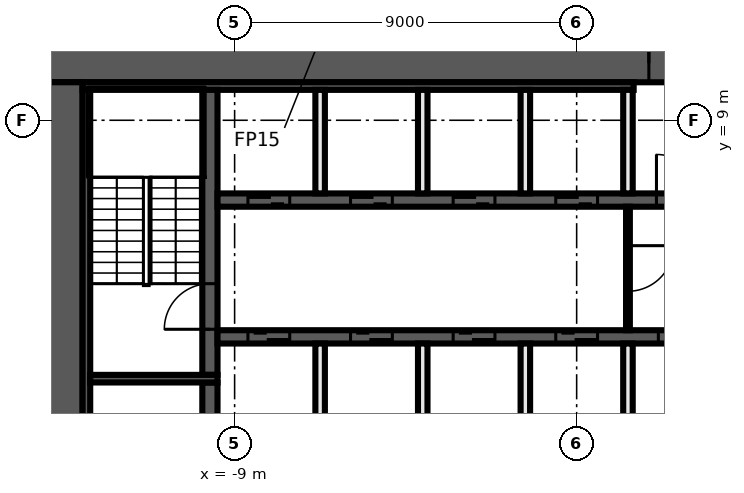
"""IFC4 building model, lengths in metres.
Left out: names, types, materials, properties, quantities, classifications, styles, units other than length and angle.
Written with IfcOpenShell. Run it as: python <this file> out.ifc"""

import sys

from ifc_helpers import new_model, si_unit, direction, frame, frame_2d, origin, place, context, subcontext, project, spatial, rectangle, extrude, element, fill, save


model = new_model("IFC4")
c1 = context("Model", 3, precision=1e-05, world=origin(), true_north=direction((0.0, 1.0)))
c2 = subcontext(c1, "Body", "Model", "MODEL_VIEW")
j1 = project(units=[si_unit("LENGTHUNIT", "METRE"), si_unit("PLANEANGLEUNIT", "RADIAN")], contexts=[c1])
p1 = place(None, origin())
s1 = spatial("IfcSite", under=j1, at=p1, CompositionType="ELEMENT")
p2 = place(p1, origin())
s2 = spatial("IfcBuilding", under=s1, at=p2, CompositionType="ELEMENT")
p3 = place(p2, frame((0.0, 0.0, 110.0)))
s3 = spatial("IfcBuildingStorey", under=s2, at=p3, CompositionType="ELEMENT", Elevation=110.0)
p4 = place(p3, frame((-14.0, 10.5, 0.0), z_axis=(0.0, 0.0, 1.0), x_axis=(1.0, 0.0, 0.0)))
e1 = element("IfcWall", 1, at=p4, inside=s3, PredefinedType="SHEAR", context=c2, shape_type="SweptSolid", body=[
    extrude(rectangle(XDim=28.0, YDim=1.0, at=frame_2d((14.0, 0.0))), origin(), (0.0, 0.0, 1.0), 3.3),
])
p5 = place(p4, frame((15.9, 0.0, 0.0)))
e2 = element("IfcOpeningElement", 2, at=p5, cuts=e1, PredefinedType="OPENING", context=c2, shape_type="SweptSolid", body=[
    extrude(rectangle(XDim=1.6, YDim=2.1, at=frame_2d((0.8, 1.05))), frame((0.0, 0.51, 0.0), z_axis=(0.0, -1.0, 0.0), x_axis=(1.0, 0.0, 0.0)), (0.0, 0.0, 1.0), 1.02),
])
p6 = place(p3, frame((-13.5, -10.0, 0.0), z_axis=(0.0, 0.0, 1.0), x_axis=(0.0, 1.0, 0.0)))
e3 = element("IfcWall", 3, at=p6, inside=s3, PredefinedType="SHEAR", context=c2, shape_type="SweptSolid", body=[
    extrude(rectangle(XDim=20.0, YDim=1.0, at=frame_2d((10.0, 0.0))), origin(), (0.0, 0.0, 1.0), 3.3),
])
p7 = place(p3, frame((-13.0, 9.9, 0.0), z_axis=(0.0, 0.0, 1.0), x_axis=(1.0, 0.0, 0.0)))
e4 = element("IfcWall", 4, at=p7, inside=s3, PredefinedType="SHEAR", context=c2, shape_type="SweptSolid", body=[
    extrude(rectangle(XDim=14.5, YDim=0.2, at=frame_2d((7.25, 0.0))), origin(), (0.0, 0.0, 1.0), 3.3),
])
p8 = place(p3, frame((-12.9, -9.8, 0.0), z_axis=(0.0, 0.0, 1.0), x_axis=(0.0, 1.0, 0.0)))
e5 = element("IfcWall", 5, at=p8, inside=s3, PredefinedType="SHEAR", context=c2, shape_type="SweptSolid", body=[
    extrude(rectangle(XDim=19.6, YDim=0.2, at=frame_2d((9.8, 0.0))), origin(), (0.0, 0.0, 1.0), 3.3),
])
p9 = place(p3, frame((-9.65, -2.1, 0.0), z_axis=(0.0, 0.0, 1.0), x_axis=(0.0, 1.0, 0.0)))
e6 = element("IfcWall", 6, at=p9, inside=s3, PredefinedType="SHEAR", context=c2, shape_type="SweptSolid", body=[
    extrude(rectangle(XDim=4.2, YDim=0.4, at=frame_2d((2.1, 0.0))), origin(), (0.0, 0.0, 1.0), 3.3),
])
p10 = place(p3, frame((-9.65, 2.3, 0.0), z_axis=(0.0, 0.0, 1.0), x_axis=(0.0, 1.0, 0.0)))
e7 = element("IfcWall", 7, at=p10, inside=s3, PredefinedType="SHEAR", context=c2, shape_type="SweptSolid", body=[
    extrude(rectangle(XDim=7.5, YDim=0.4, at=frame_2d((3.75, 0.0))), origin(), (0.0, 0.0, 1.0), 3.3),
])
p11 = place(p10, frame((1.2, 0.0, 0.0)))
e8 = element("IfcOpeningElement", 8, at=p11, cuts=e7, PredefinedType="OPENING", context=c2, shape_type="SweptSolid", body=[
    extrude(rectangle(XDim=1.2, YDim=2.1, at=frame_2d((0.6, 1.05))), frame((0.0, 0.21, 0.0), z_axis=(0.0, -1.0, 0.0), x_axis=(1.0, 0.0, 0.0)), (0.0, 0.0, 1.0), 0.42),
])
p12 = place(p3, frame((-9.45, 2.2, 0.0), z_axis=(0.0, 0.0, 1.0), x_axis=(-1.0, 0.0, 0.0)))
e9 = element("IfcWall", 9, at=p12, inside=s3, PredefinedType="SHEAR", context=c2, shape_type="SweptSolid", body=[
    extrude(rectangle(XDim=3.35, YDim=0.2, at=frame_2d((1.675, 0.0))), origin(), (0.0, 0.0, 1.0), 3.3),
])
p13 = place(p3, frame((-9.45, 6.9, 0.0), z_axis=(0.0, 0.0, 1.0), x_axis=(1.0, 0.0, 0.0)))
e10 = element("IfcWall", 10, at=p13, inside=s3, PredefinedType="SHEAR", context=c2, shape_type="SweptSolid", body=[
    extrude(rectangle(XDim=18.9, YDim=0.35, at=frame_2d((9.45, 0.0))), origin(), (0.0, 0.0, 1.0), 3.3),
])
p14 = place(p13, frame((0.8, 0.0, 0.0)))
e11 = element("IfcOpeningElement", 11, at=p14, cuts=e10, PredefinedType="OPENING", context=c2, shape_type="SweptSolid", body=[
    extrude(rectangle(XDim=1.1, YDim=2.1, at=frame_2d((0.55, 1.05))), frame((0.0, 0.185, 0.0), z_axis=(0.0, -1.0, 0.0), x_axis=(1.0, 0.0, 0.0)), (0.0, 0.0, 1.0), 0.37),
])
p15 = place(p13, frame((3.5, 0.0, 0.0)))
e12 = element("IfcOpeningElement", 12, at=p15, cuts=e10, PredefinedType="OPENING", context=c2, shape_type="SweptSolid", body=[
    extrude(rectangle(XDim=1.1, YDim=2.1, at=frame_2d((0.55, 1.05))), frame((0.0, 0.185, 0.0), z_axis=(0.0, -1.0, 0.0), x_axis=(1.0, 0.0, 0.0)), (0.0, 0.0, 1.0), 0.37),
])
p16 = place(p13, frame((6.2, 0.0, 0.0)))
e13 = element("IfcOpeningElement", 13, at=p16, cuts=e10, PredefinedType="OPENING", context=c2, shape_type="SweptSolid", body=[
    extrude(rectangle(XDim=1.1, YDim=2.1, at=frame_2d((0.55, 1.05))), frame((0.0, 0.185, 0.0), z_axis=(0.0, -1.0, 0.0), x_axis=(1.0, 0.0, 0.0)), (0.0, 0.0, 1.0), 0.37),
])
p17 = place(p13, frame((8.9, 0.0, 0.0)))
e14 = element("IfcOpeningElement", 14, at=p17, cuts=e10, PredefinedType="OPENING", context=c2, shape_type="SweptSolid", body=[
    extrude(rectangle(XDim=1.1, YDim=2.1, at=frame_2d((0.55, 1.05))), frame((0.0, 0.185, 0.0), z_axis=(0.0, -1.0, 0.0), x_axis=(1.0, 0.0, 0.0)), (0.0, 0.0, 1.0), 0.37),
])
p18 = place(p13, frame((11.55, 0.0, 0.0)))
e15 = element("IfcOpeningElement", 15, at=p18, cuts=e10, PredefinedType="OPENING", context=c2, shape_type="SweptSolid", body=[
    extrude(rectangle(XDim=1.2, YDim=2.1, at=frame_2d((0.6, 1.05))), frame((0.0, 0.185, 0.0), z_axis=(0.0, -1.0, 0.0), x_axis=(1.0, 0.0, 0.0)), (0.0, 0.0, 1.0), 0.37),
])
p19 = place(p13, frame((14.3, 0.0, 0.0)))
e16 = element("IfcOpeningElement", 16, at=p19, cuts=e10, PredefinedType="OPENING", context=c2, shape_type="SweptSolid", body=[
    extrude(rectangle(XDim=1.1, YDim=2.1, at=frame_2d((0.55, 1.05))), frame((0.0, 0.185, 0.0), z_axis=(0.0, -1.0, 0.0), x_axis=(1.0, 0.0, 0.0)), (0.0, 0.0, 1.0), 0.37),
])
p20 = place(p13, frame((17.0, 0.0, 0.0)))
e17 = element("IfcOpeningElement", 17, at=p20, cuts=e10, PredefinedType="OPENING", context=c2, shape_type="SweptSolid", body=[
    extrude(rectangle(XDim=1.1, YDim=2.1, at=frame_2d((0.55, 1.05))), frame((0.0, 0.185, 0.0), z_axis=(0.0, -1.0, 0.0), x_axis=(1.0, 0.0, 0.0)), (0.0, 0.0, 1.0), 0.37),
])
p21 = place(p3, frame((9.45, 3.3, 0.0), z_axis=(0.0, 0.0, 1.0), x_axis=(-1.0, 0.0, 0.0)))
e18 = element("IfcWall", 18, at=p21, inside=s3, PredefinedType="SHEAR", context=c2, shape_type="SweptSolid", body=[
    extrude(rectangle(XDim=18.9, YDim=0.35, at=frame_2d((9.45, 0.0))), origin(), (0.0, 0.0, 1.0), 3.3),
])
p22 = place(p21, frame((17.0, 0.0, 0.0)))
e19 = element("IfcOpeningElement", 19, at=p22, cuts=e18, PredefinedType="OPENING", context=c2, shape_type="SweptSolid", body=[
    extrude(rectangle(XDim=1.1, YDim=2.1, at=frame_2d((0.55, 1.05))), frame((0.0, 0.185, 0.0), z_axis=(0.0, -1.0, 0.0), x_axis=(1.0, 0.0, 0.0)), (0.0, 0.0, 1.0), 0.37),
])
p23 = place(p21, frame((14.3, 0.0, 0.0)))
e20 = element("IfcOpeningElement", 20, at=p23, cuts=e18, PredefinedType="OPENING", context=c2, shape_type="SweptSolid", body=[
    extrude(rectangle(XDim=1.1, YDim=2.1, at=frame_2d((0.55, 1.05))), frame((0.0, 0.185, 0.0), z_axis=(0.0, -1.0, 0.0), x_axis=(1.0, 0.0, 0.0)), (0.0, 0.0, 1.0), 0.37),
])
p24 = place(p21, frame((11.6, 0.0, 0.0)))
e21 = element("IfcOpeningElement", 21, at=p24, cuts=e18, PredefinedType="OPENING", context=c2, shape_type="SweptSolid", body=[
    extrude(rectangle(XDim=1.1, YDim=2.1, at=frame_2d((0.55, 1.05))), frame((0.0, 0.185, 0.0), z_axis=(0.0, -1.0, 0.0), x_axis=(1.0, 0.0, 0.0)), (0.0, 0.0, 1.0), 0.37),
])
p25 = place(p21, frame((8.9, 0.0, 0.0)))
e22 = element("IfcOpeningElement", 22, at=p25, cuts=e18, PredefinedType="OPENING", context=c2, shape_type="SweptSolid", body=[
    extrude(rectangle(XDim=1.1, YDim=2.1, at=frame_2d((0.55, 1.05))), frame((0.0, 0.185, 0.0), z_axis=(0.0, -1.0, 0.0), x_axis=(1.0, 0.0, 0.0)), (0.0, 0.0, 1.0), 0.37),
])
p26 = place(p21, frame((6.2, 0.0, 0.0)))
e23 = element("IfcOpeningElement", 23, at=p26, cuts=e18, PredefinedType="OPENING", context=c2, shape_type="SweptSolid", body=[
    extrude(rectangle(XDim=1.1, YDim=2.1, at=frame_2d((0.55, 1.05))), frame((0.0, 0.185, 0.0), z_axis=(0.0, -1.0, 0.0), x_axis=(1.0, 0.0, 0.0)), (0.0, 0.0, 1.0), 0.37),
])
p27 = place(p21, frame((3.5, 0.0, 0.0)))
e24 = element("IfcOpeningElement", 24, at=p27, cuts=e18, PredefinedType="OPENING", context=c2, shape_type="SweptSolid", body=[
    extrude(rectangle(XDim=1.1, YDim=2.1, at=frame_2d((0.55, 1.05))), frame((0.0, 0.185, 0.0), z_axis=(0.0, -1.0, 0.0), x_axis=(1.0, 0.0, 0.0)), (0.0, 0.0, 1.0), 0.37),
])
p28 = place(p21, frame((0.9, 0.0, 0.0)))
e25 = element("IfcOpeningElement", 25, at=p28, cuts=e18, PredefinedType="OPENING", context=c2, shape_type="SweptSolid", body=[
    extrude(rectangle(XDim=0.9, YDim=2.1, at=frame_2d((0.45, 1.05))), frame((0.0, 0.185, 0.0), z_axis=(0.0, -1.0, 0.0), x_axis=(1.0, 0.0, 0.0)), (0.0, 0.0, 1.0), 0.37),
])
p29 = place(p3, frame((1.35, 6.725, 0.0), z_axis=(0.0, 0.0, 1.0), x_axis=(0.0, -1.0, 0.0)))
e26 = element("IfcWall", 26, at=p29, inside=s3, PredefinedType="PARTITIONING", context=c2, shape_type="SweptSolid", body=[
    extrude(rectangle(XDim=3.25, YDim=0.1, at=frame_2d((1.625, 0.0))), origin(), (0.0, 0.0, 1.0), 3.3),
])
p30 = place(p29, frame((1.025, 0.0, 0.0)))
e27 = element("IfcOpeningElement", 27, at=p30, cuts=e26, PredefinedType="OPENING", context=c2, shape_type="SweptSolid", body=[
    extrude(rectangle(XDim=1.2, YDim=2.1, at=frame_2d((0.6, 1.05))), frame((0.0, 0.06, 0.0), z_axis=(0.0, -1.0, 0.0), x_axis=(1.0, 0.0, 0.0)), (0.0, 0.0, 1.0), 0.12),
])
for number, where, z_axis, x_axis in (
    (28, (1.35, 0.4, 0.0), (0.0, 0.0, 1.0), (0.0, 1.0, 0.0)),
    (29, (1.35, 7.075, 0.0), (0.0, 0.0, 1.0), (0.0, 1.0, 0.0)),
    (30, (-1.35, 0.4, 0.0), (0.0, 0.0, 1.0), (0.0, 1.0, 0.0)),
    (31, (-1.35, 7.075, 0.0), (0.0, 0.0, 1.0), (0.0, 1.0, 0.0)),
    (32, (-4.05, 0.4, 0.0), (0.0, 0.0, 1.0), (0.0, 1.0, 0.0)),
    (33, (-4.05, 7.075, 0.0), (0.0, 0.0, 1.0), (0.0, 1.0, 0.0)),
    (34, (-6.75, 0.4, 0.0), (0.0, 0.0, 1.0), (0.0, 1.0, 0.0)),
    (35, (-6.75, 7.075, 0.0), (0.0, 0.0, 1.0), (0.0, 1.0, 0.0)),
):
    element("IfcWall", number, at=place(p3, frame(where, z_axis=z_axis, x_axis=x_axis)), inside=s3, PredefinedType="SOLIDWALL", context=c2, shape_type="SweptSolid", body=[
        extrude(rectangle(XDim=2.725, YDim=0.25, at=frame_2d((1.363, 0.0))), origin(), (0.0, 0.0, 1.0), 3.3),
    ])
p31 = place(p14, origin())
e36 = element("IfcDoor", 36, at=p31, inside=s3, OperationType="DOUBLE_DOOR_SLIDING", PredefinedType="DOOR", context=c2, shape_type="SweptSolid", body=[
    extrude(rectangle(XDim=1.1, YDim=2.1, at=frame_2d((0.55, 1.05))), frame((0.0, 0.025, 0.0), z_axis=(0.0, -1.0, 0.0), x_axis=(1.0, 0.0, 0.0)), (0.0, 0.0, 1.0), 0.05),
])
fill(e11, e36)
p32 = place(p15, origin())
e37 = element("IfcDoor", 37, at=p32, inside=s3, OperationType="DOUBLE_DOOR_SLIDING", PredefinedType="DOOR", context=c2, shape_type="SweptSolid", body=[
    extrude(rectangle(XDim=1.1, YDim=2.1, at=frame_2d((0.55, 1.05))), frame((0.0, 0.025, 0.0), z_axis=(0.0, -1.0, 0.0), x_axis=(1.0, 0.0, 0.0)), (0.0, 0.0, 1.0), 0.05),
])
fill(e12, e37)
p33 = place(p16, origin())
e38 = element("IfcDoor", 38, at=p33, inside=s3, OperationType="DOUBLE_DOOR_SLIDING", PredefinedType="DOOR", context=c2, shape_type="SweptSolid", body=[
    extrude(rectangle(XDim=1.1, YDim=2.1, at=frame_2d((0.55, 1.05))), frame((0.0, 0.025, 0.0), z_axis=(0.0, -1.0, 0.0), x_axis=(1.0, 0.0, 0.0)), (0.0, 0.0, 1.0), 0.05),
])
fill(e13, e38)
p34 = place(p17, origin())
e39 = element("IfcDoor", 39, at=p34, inside=s3, OperationType="DOUBLE_DOOR_SLIDING", PredefinedType="DOOR", context=c2, shape_type="SweptSolid", body=[
    extrude(rectangle(XDim=1.1, YDim=2.1, at=frame_2d((0.55, 1.05))), frame((0.0, 0.025, 0.0), z_axis=(0.0, -1.0, 0.0), x_axis=(1.0, 0.0, 0.0)), (0.0, 0.0, 1.0), 0.05),
])
fill(e14, e39)
p35 = place(p5, origin())
e40 = element("IfcDoor", 40, at=p35, inside=s3, OperationType="DOUBLE_DOOR_SINGLE_SWING", PredefinedType="DOOR", context=c2, shape_type="SweptSolid", body=[
    extrude(rectangle(XDim=1.6, YDim=2.1, at=frame_2d((0.8, 1.05))), frame((0.0, 0.025, 0.0), z_axis=(0.0, -1.0, 0.0), x_axis=(1.0, 0.0, 0.0)), (0.0, 0.0, 1.0), 0.05),
])
fill(e2, e40)
p36 = place(p18, origin())
e41 = element("IfcDoor", 41, at=p36, inside=s3, OperationType="SINGLE_SWING_LEFT", PredefinedType="DOOR", context=c2, shape_type="SweptSolid", body=[
    extrude(rectangle(XDim=1.2, YDim=2.1, at=frame_2d((0.6, 1.05))), frame((0.0, 0.025, 0.0), z_axis=(0.0, -1.0, 0.0), x_axis=(1.0, 0.0, 0.0)), (0.0, 0.0, 1.0), 0.05),
])
fill(e15, e41)
p37 = place(p22, origin())
e42 = element("IfcDoor", 42, at=p37, inside=s3, OperationType="DOUBLE_DOOR_SLIDING", PredefinedType="DOOR", context=c2, shape_type="SweptSolid", body=[
    extrude(rectangle(XDim=1.1, YDim=2.1, at=frame_2d((0.55, 1.05))), frame((0.0, 0.025, 0.0), z_axis=(0.0, -1.0, 0.0), x_axis=(1.0, 0.0, 0.0)), (0.0, 0.0, 1.0), 0.05),
])
fill(e19, e42)
p38 = place(p23, origin())
e43 = element("IfcDoor", 43, at=p38, inside=s3, OperationType="DOUBLE_DOOR_SLIDING", PredefinedType="DOOR", context=c2, shape_type="SweptSolid", body=[
    extrude(rectangle(XDim=1.1, YDim=2.1, at=frame_2d((0.55, 1.05))), frame((0.0, 0.025, 0.0), z_axis=(0.0, -1.0, 0.0), x_axis=(1.0, 0.0, 0.0)), (0.0, 0.0, 1.0), 0.05),
])
fill(e20, e43)
p39 = place(p24, origin())
e44 = element("IfcDoor", 44, at=p39, inside=s3, OperationType="DOUBLE_DOOR_SLIDING", PredefinedType="DOOR", context=c2, shape_type="SweptSolid", body=[
    extrude(rectangle(XDim=1.1, YDim=2.1, at=frame_2d((0.55, 1.05))), frame((0.0, 0.025, 0.0), z_axis=(0.0, -1.0, 0.0), x_axis=(1.0, 0.0, 0.0)), (0.0, 0.0, 1.0), 0.05),
])
fill(e21, e44)
p40 = place(p25, origin())
e45 = element("IfcDoor", 45, at=p40, inside=s3, OperationType="DOUBLE_DOOR_SLIDING", PredefinedType="DOOR", context=c2, shape_type="SweptSolid", body=[
    extrude(rectangle(XDim=1.1, YDim=2.1, at=frame_2d((0.55, 1.05))), frame((0.0, 0.025, 0.0), z_axis=(0.0, -1.0, 0.0), x_axis=(1.0, 0.0, 0.0)), (0.0, 0.0, 1.0), 0.05),
])
fill(e22, e45)
p41 = place(p26, origin())
e46 = element("IfcDoor", 46, at=p41, inside=s3, OperationType="DOUBLE_DOOR_SLIDING", PredefinedType="DOOR", context=c2, shape_type="SweptSolid", body=[
    extrude(rectangle(XDim=1.1, YDim=2.1, at=frame_2d((0.55, 1.05))), frame((0.0, 0.025, 0.0), z_axis=(0.0, -1.0, 0.0), x_axis=(1.0, 0.0, 0.0)), (0.0, 0.0, 1.0), 0.05),
])
fill(e23, e46)
p42 = place(p11, origin())
e47 = element("IfcDoor", 47, at=p42, inside=s3, OperationType="SINGLE_SWING_RIGHT", PredefinedType="DOOR", context=c2, shape_type="SweptSolid", body=[
    extrude(rectangle(XDim=1.2, YDim=2.1, at=frame_2d((0.6, 1.05))), frame((0.0, 0.025, 0.0), z_axis=(0.0, -1.0, 0.0), x_axis=(1.0, 0.0, 0.0)), (0.0, 0.0, 1.0), 0.05),
])
fill(e8, e47)
p43 = place(p30, origin())
e48 = element("IfcDoor", 48, at=p43, inside=s3, OperationType="SINGLE_SWING_LEFT", PredefinedType="DOOR", context=c2, shape_type="SweptSolid", body=[
    extrude(rectangle(XDim=1.2, YDim=2.1, at=frame_2d((0.6, 1.05))), frame((0.0, 0.025, 0.0), z_axis=(0.0, -1.0, 0.0), x_axis=(1.0, 0.0, 0.0)), (0.0, 0.0, 1.0), 0.05),
])
fill(e27, e48)
save(model, sys.argv[1])
